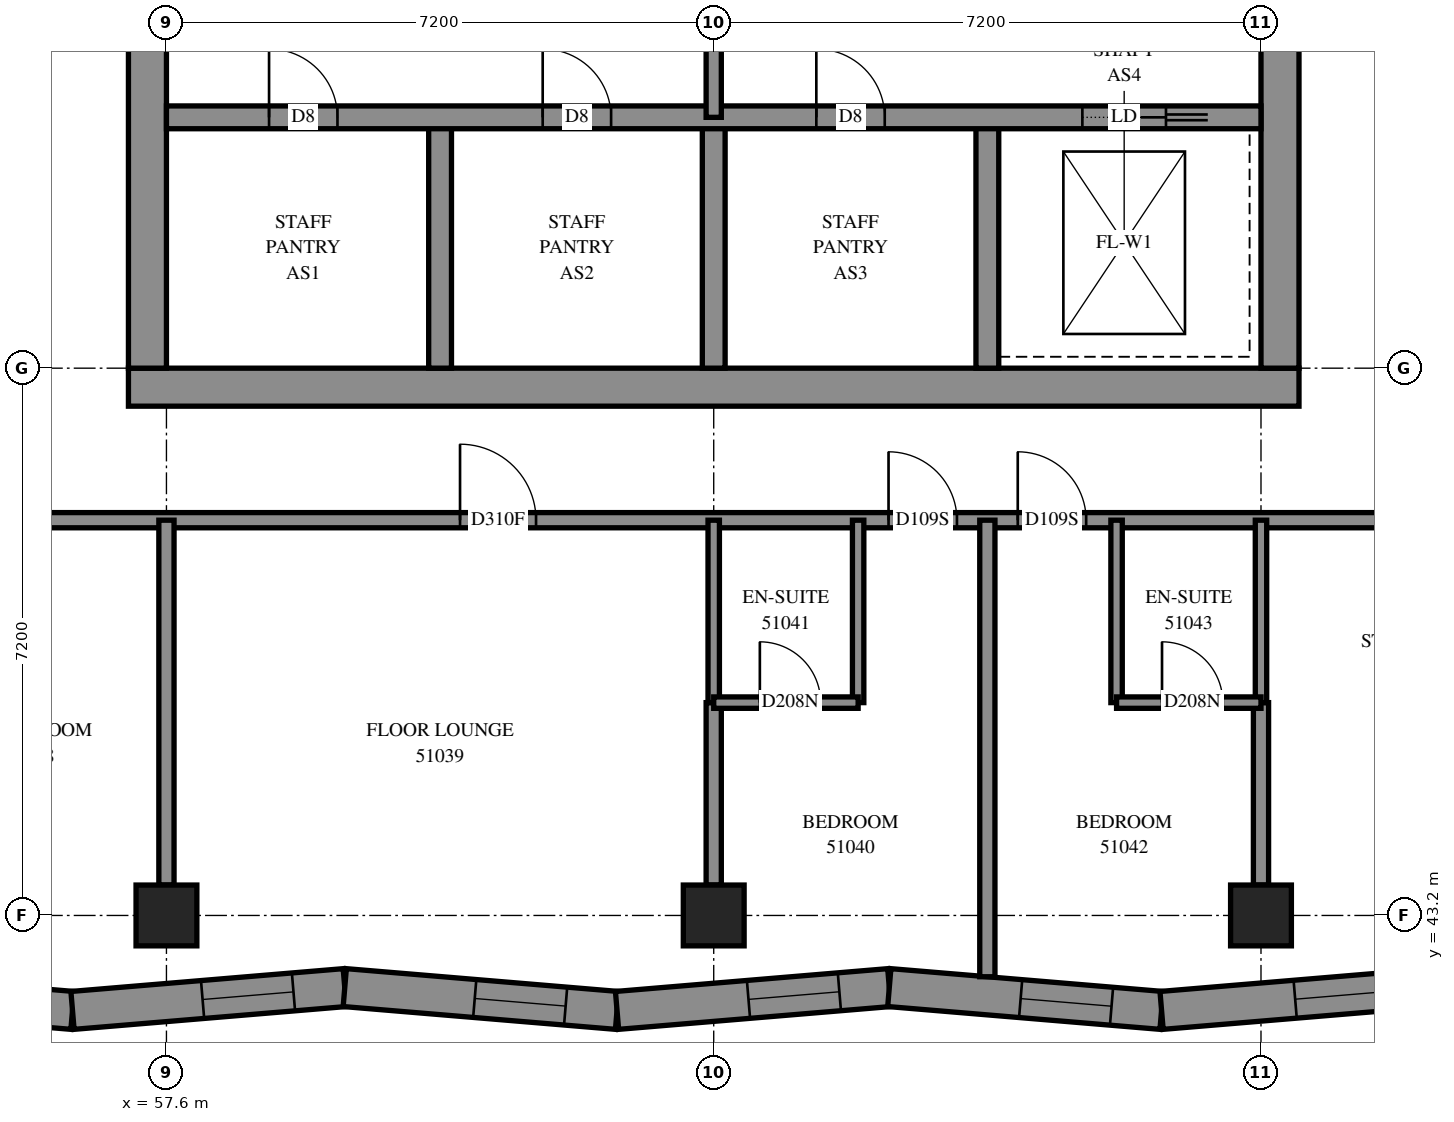
"""IFC4 building model, lengths in metres.
Left out: names, types, materials, properties, quantities, classifications, styles, units other than length and angle.
Written with IfcOpenShell. Run it as: python <this file> out.ifc"""

import sys

from ifc_helpers import new_model, si_unit, direction, frame, frame_2d, origin, origin_2d, place, context, subcontext, project, spatial, polyline, rectangle, outline, extrude, element, fill, save


model = new_model("IFC4")
c1 = context("Model", 3, precision=1e-05, world=origin(), true_north=direction((0.0, 1.0)))
c2 = subcontext(c1, "Body", "Model", "MODEL_VIEW")
j1 = project(units=[si_unit("LENGTHUNIT", "METRE"), si_unit("PLANEANGLEUNIT", "RADIAN")], contexts=[c1])
p1 = place(None, origin())
s1 = spatial("IfcSite", under=j1, at=p1, CompositionType="ELEMENT")
p2 = place(p1, origin())
s2 = spatial("IfcBuilding", under=s1, at=p2, CompositionType="ELEMENT")
p3 = place(p2, frame((0.0, 0.0, 189.6)))
s3 = spatial("IfcBuildingStorey", under=s2, at=p3, CompositionType="ELEMENT", Elevation=189.6)
for number, where, z_axis, x_axis in (
    (1, (57.6, 43.2, 0.0), (0.0, 0.0, 1.0), (1.0, 0.0, 0.0)),
    (2, (64.8, 43.2, 0.0), (0.0, 0.0, 1.0), (1.0, 0.0, 0.0)),
    (3, (72.0, 43.2, 0.0), (0.0, 0.0, 1.0), (1.0, 0.0, 0.0)),
):
    element("IfcColumn", number, at=place(p3, frame(where, z_axis=z_axis, x_axis=x_axis)), inside=s3, PredefinedType="COLUMN", context=c2, shape_type="SweptSolid", body=[
        extrude(rectangle(XDim=0.8, YDim=0.8, at=origin_2d()), origin(), (0.0, 0.0, 1.0), 3.1),
    ])
p4 = place(p3, frame((57.1, 50.15, -0.3), z_axis=(0.0, 0.0, 1.0), x_axis=(1.0, 0.0, 0.0)))
e4 = element("IfcWall", 4, at=p4, inside=s3, PredefinedType="SHEAR", context=c2, shape_type="SweptSolid", body=[
    extrude(rectangle(XDim=15.4, YDim=0.5, at=frame_2d((7.7, 0.0))), origin(), (0.0, 0.0, 1.0), 2.7),
])
p5 = place(p3, frame((57.35, 50.4, -0.3), z_axis=(0.0, 0.0, 1.0), x_axis=(0.0, 1.0, 0.0)))
e5 = element("IfcWall", 5, at=p5, inside=s3, PredefinedType="SHEAR", context=c2, shape_type="SweptSolid", body=[
    extrude(rectangle(XDim=14.4, YDim=0.5, at=frame_2d((7.2, 0.0))), origin(), (0.0, 0.0, 1.0), 2.7),
])
p6 = place(p5, frame((4.55, 0.0, 0.3)))
e6 = element("IfcOpeningElement", 6, at=p6, cuts=e5, PredefinedType="OPENING", context=c2, shape_type="SweptSolid", body=[
    extrude(rectangle(XDim=1.1, YDim=2.1, at=frame_2d((0.55, 1.05))), frame((0.0, 0.26, 0.0), z_axis=(0.0, -1.0, 0.0), x_axis=(1.0, 0.0, 0.0)), (0.0, 0.0, 1.0), 0.52),
])
p7 = place(p5, frame((11.35, 0.0, 0.3)))
e7 = element("IfcOpeningElement", 7, at=p7, cuts=e5, PredefinedType="OPENING", context=c2, shape_type="SweptSolid", body=[
    extrude(rectangle(XDim=1.1, YDim=2.1, at=frame_2d((0.55, 1.05))), frame((0.0, 0.26, 0.0), z_axis=(0.0, -1.0, 0.0), x_axis=(1.0, 0.0, 0.0)), (0.0, 0.0, 1.0), 0.52),
])
p8 = place(p3, frame((72.25, 50.4, -0.3), z_axis=(0.0, 0.0, 1.0), x_axis=(0.0, 1.0, 0.0)))
e8 = element("IfcWall", 8, at=p8, inside=s3, PredefinedType="SHEAR", context=c2, shape_type="SweptSolid", body=[
    extrude(rectangle(XDim=14.4, YDim=0.5, at=frame_2d((7.2, 0.0))), origin(), (0.0, 0.0, 1.0), 2.7),
])
p9 = place(p8, frame((4.55, 0.0, 0.3)))
e9 = element("IfcOpeningElement", 9, at=p9, cuts=e8, PredefinedType="OPENING", context=c2, shape_type="SweptSolid", body=[
    extrude(rectangle(XDim=1.1, YDim=2.1, at=frame_2d((0.55, 1.05))), frame((0.0, 0.26, 0.0), z_axis=(0.0, -1.0, 0.0), x_axis=(1.0, 0.0, 0.0)), (0.0, 0.0, 1.0), 0.52),
])
p10 = place(p8, frame((11.35, 0.0, 0.3)))
e10 = element("IfcOpeningElement", 10, at=p10, cuts=e8, PredefinedType="OPENING", context=c2, shape_type="SweptSolid", body=[
    extrude(rectangle(XDim=1.1, YDim=2.1, at=frame_2d((0.55, 1.05))), frame((0.0, 0.26, 0.0), z_axis=(0.0, -1.0, 0.0), x_axis=(1.0, 0.0, 0.0)), (0.0, 0.0, 1.0), 0.52),
])
for number, where, z_axis, x_axis in (
    (11, (61.2, 50.4, 0.0), (0.0, 0.0, 1.0), (0.0, 1.0, 0.0)),
    (12, (64.8, 50.4, 0.0), (0.0, 0.0, 1.0), (0.0, 1.0, 0.0)),
    (13, (68.4, 50.4, 0.0), (0.0, 0.0, 1.0), (0.0, 1.0, 0.0)),
):
    element("IfcWall", number, at=place(p3, frame(where, z_axis=z_axis, x_axis=x_axis)), inside=s3, PredefinedType="SOLIDWALL", context=c2, shape_type="SweptSolid", body=[
        extrude(rectangle(XDim=3.3, YDim=0.3, at=frame_2d((1.65, 0.0))), origin(), (0.0, 0.0, 1.0), 3.1),
    ])
p11 = place(p3, frame((57.6, 53.7, 0.0), z_axis=(0.0, 0.0, 1.0), x_axis=(1.0, 0.0, 0.0)))
e14 = element("IfcWall", 14, at=p11, inside=s3, PredefinedType="SOLIDWALL", context=c2, shape_type="SweptSolid", body=[
    extrude(rectangle(XDim=14.4, YDim=0.3, at=frame_2d((7.2, 0.0))), origin(), (0.0, 0.0, 1.0), 3.1),
])
p12 = place(p11, frame((1.35, 0.0, 0.0)))
e15 = element("IfcOpeningElement", 15, at=p12, cuts=e14, PredefinedType="OPENING", context=c2, shape_type="SweptSolid", body=[
    extrude(rectangle(XDim=0.9, YDim=2.1, at=frame_2d((0.45, 1.05))), frame((0.0, 0.16, 0.0), z_axis=(0.0, -1.0, 0.0), x_axis=(1.0, 0.0, 0.0)), (0.0, 0.0, 1.0), 0.32),
])
p13 = place(p11, frame((4.95, 0.0, 0.0)))
e16 = element("IfcOpeningElement", 16, at=p13, cuts=e14, PredefinedType="OPENING", context=c2, shape_type="SweptSolid", body=[
    extrude(rectangle(XDim=0.9, YDim=2.1, at=frame_2d((0.45, 1.05))), frame((0.0, 0.16, 0.0), z_axis=(0.0, -1.0, 0.0), x_axis=(1.0, 0.0, 0.0)), (0.0, 0.0, 1.0), 0.32),
])
p14 = place(p11, frame((8.55, 0.0, 0.0)))
e17 = element("IfcOpeningElement", 17, at=p14, cuts=e14, PredefinedType="OPENING", context=c2, shape_type="SweptSolid", body=[
    extrude(rectangle(XDim=0.9, YDim=2.1, at=frame_2d((0.45, 1.05))), frame((0.0, 0.16, 0.0), z_axis=(0.0, -1.0, 0.0), x_axis=(1.0, 0.0, 0.0)), (0.0, 0.0, 1.0), 0.32),
])
p15 = place(p11, frame((12.05, 0.0, 0.0)))
e18 = element("IfcOpeningElement", 18, at=p15, cuts=e14, PredefinedType="OPENING", context=c2, shape_type="SweptSolid", body=[
    extrude(rectangle(XDim=1.1, YDim=2.1, at=frame_2d((0.55, 1.05))), frame((0.0, 0.16, 0.0), z_axis=(0.0, -1.0, 0.0), x_axis=(1.0, 0.0, 0.0)), (0.0, 0.0, 1.0), 0.32),
])
p16 = place(p3, frame((52.761, 42.253, 0.0), z_axis=(0.0, 0.0, 1.0), x_axis=(0.9965117188, -0.0834529466, 0.0)))
e19 = element("IfcWall", 19, at=p16, inside=s3, PredefinedType="SOLIDWALL", context=c2, shape_type="SweptSolid", body=[
    extrude(outline(polyline([(0.042, -0.25), (3.636, -0.25), (3.594, 0.25), (-0.042, 0.25), (0.042, -0.25)])), origin(), (0.0, 0.0, 1.0), 3.1),
])
p17 = place(p16, frame((1.719, 0.0, 0.45)))
e20 = element("IfcOpeningElement", 20, at=p17, cuts=e19, PredefinedType="OPENING", context=c2, shape_type="SweptSolid", body=[
    extrude(rectangle(XDim=1.2, YDim=2.5, at=frame_2d((0.6, 1.25))), frame((0.0, 0.26, 0.0), z_axis=(0.0, -1.0, 0.0), x_axis=(1.0, 0.0, 0.0)), (0.0, 0.0, 1.0), 0.52),
])
p18 = place(p3, frame((56.364, 41.951, 0.0), z_axis=(0.0, 0.0, 1.0), x_axis=(0.9965111369, 0.0834598942, 0.0)))
e21 = element("IfcWall", 21, at=p18, inside=s3, PredefinedType="SOLIDWALL", context=c2, shape_type="SweptSolid", body=[
    extrude(outline(polyline([(-0.021, -0.25), (3.574, -0.25), (3.615, 0.25), (0.021, 0.25), (-0.021, -0.25)])), origin(), (0.0, 0.0, 1.0), 3.1),
])
p19 = place(p18, frame((1.717, 0.0, 0.45)))
e22 = element("IfcOpeningElement", 22, at=p19, cuts=e21, PredefinedType="OPENING", context=c2, shape_type="SweptSolid", body=[
    extrude(rectangle(XDim=1.2, YDim=2.5, at=frame_2d((0.6, 1.25))), frame((0.0, 0.26, 0.0), z_axis=(0.0, -1.0, 0.0), x_axis=(1.0, 0.0, 0.0)), (0.0, 0.0, 1.0), 0.52),
])
p20 = place(p3, frame((59.946, 42.251, 0.0), z_axis=(0.0, 0.0, 1.0), x_axis=(0.9965109432, -0.083462208, 0.0)))
e23 = element("IfcWall", 23, at=p20, inside=s3, PredefinedType="SOLIDWALL", context=c2, shape_type="SweptSolid", body=[
    extrude(outline(polyline([(0.021, -0.25), (3.615, -0.25), (3.574, 0.25), (-0.021, 0.25), (0.021, -0.25)])), origin(), (0.0, 0.0, 1.0), 3.1),
])
p21 = place(p20, frame((1.716, 0.0, 0.45)))
e24 = element("IfcOpeningElement", 24, at=p21, cuts=e23, PredefinedType="OPENING", context=c2, shape_type="SweptSolid", body=[
    extrude(rectangle(XDim=1.2, YDim=2.5, at=frame_2d((0.6, 1.25))), frame((0.0, 0.26, 0.0), z_axis=(0.0, -1.0, 0.0), x_axis=(1.0, 0.0, 0.0)), (0.0, 0.0, 1.0), 0.52),
])
p22 = place(p3, frame((63.528, 41.951, 0.0), z_axis=(0.0, 0.0, 1.0), x_axis=(0.9965111369, 0.0834598942, 0.0)))
e25 = element("IfcWall", 25, at=p22, inside=s3, PredefinedType="SOLIDWALL", context=c2, shape_type="SweptSolid", body=[
    extrude(outline(polyline([(-0.021, -0.25), (3.574, -0.25), (3.615, 0.25), (0.021, 0.25), (-0.021, -0.25)])), origin(), (0.0, 0.0, 1.0), 3.1),
])
p23 = place(p22, frame((1.736, 0.0, 0.45)))
e26 = element("IfcOpeningElement", 26, at=p23, cuts=e25, PredefinedType="OPENING", context=c2, shape_type="SweptSolid", body=[
    extrude(rectangle(XDim=1.2, YDim=2.5, at=frame_2d((0.6, 1.25))), frame((0.0, 0.26, 0.0), z_axis=(0.0, -1.0, 0.0), x_axis=(1.0, 0.0, 0.0)), (0.0, 0.0, 1.0), 0.52),
])
p24 = place(p3, frame((67.11, 42.251, 0.0), z_axis=(0.0, 0.0, 1.0), x_axis=(0.9965111369, -0.0834598942, 0.0)))
e27 = element("IfcWall", 27, at=p24, inside=s3, PredefinedType="SOLIDWALL", context=c2, shape_type="SweptSolid", body=[
    extrude(outline(polyline([(0.021, -0.25), (3.615, -0.25), (3.574, 0.25), (-0.021, 0.25), (0.021, -0.25)])), origin(), (0.0, 0.0, 1.0), 3.1),
])
p25 = place(p24, frame((1.734, 0.0, 0.45)))
e28 = element("IfcOpeningElement", 28, at=p25, cuts=e27, PredefinedType="OPENING", context=c2, shape_type="SweptSolid", body=[
    extrude(rectangle(XDim=1.2, YDim=2.5, at=frame_2d((0.6, 1.25))), frame((0.0, 0.26, 0.0), z_axis=(0.0, -1.0, 0.0), x_axis=(1.0, 0.0, 0.0)), (0.0, 0.0, 1.0), 0.52),
])
p26 = place(p3, frame((70.692, 41.951, 0.0), z_axis=(0.0, 0.0, 1.0), x_axis=(0.9965117188, 0.0834529466, 0.0)))
e29 = element("IfcWall", 29, at=p26, inside=s3, PredefinedType="SOLIDWALL", context=c2, shape_type="SweptSolid", body=[
    extrude(outline(polyline([(-0.021, -0.25), (3.574, -0.25), (3.657, 0.25), (0.021, 0.25), (-0.021, -0.25)])), origin(), (0.0, 0.0, 1.0), 3.1),
])
p27 = place(p26, frame((1.764, 0.0, 0.45)))
e30 = element("IfcOpeningElement", 30, at=p27, cuts=e29, PredefinedType="OPENING", context=c2, shape_type="SweptSolid", body=[
    extrude(rectangle(XDim=1.2, YDim=2.5, at=frame_2d((0.6, 1.25))), frame((0.0, 0.26, 0.0), z_axis=(0.0, -1.0, 0.0), x_axis=(1.0, 0.0, 0.0)), (0.0, 0.0, 1.0), 0.52),
])
p28 = place(p3, frame((64.8, 53.7, 0.0), z_axis=(0.0, 0.0, 1.0), x_axis=(0.0, 1.0, 0.0)))
e31 = element("IfcWall", 31, at=p28, inside=s3, PredefinedType="PARTITIONING", context=c2, shape_type="SweptSolid", body=[
    extrude(rectangle(XDim=3.6, YDim=0.2, at=frame_2d((1.8, 0.0))), origin(), (0.0, 0.0, 1.0), 3.1),
])
p29 = place(p3, frame((55.6, 48.4, 0.0), z_axis=(0.0, 0.0, 1.0), x_axis=(1.0, 0.0, 0.0)))
e32 = element("IfcWall", 32, at=p29, inside=s3, PredefinedType="PARTITIONING", context=c2, shape_type="SweptSolid", body=[
    extrude(rectangle(XDim=18.4, YDim=0.2, at=frame_2d((9.2, 0.0))), origin(), (0.0, 0.0, 1.0), 3.1),
])
p30 = place(p29, frame((5.862, 0.0, 0.0)))
e33 = element("IfcOpeningElement", 33, at=p30, cuts=e32, PredefinedType="OPENING", context=c2, shape_type="SweptSolid", body=[
    extrude(rectangle(XDim=1.0, YDim=2.1, at=frame_2d((0.5, 1.05))), frame((0.0, 0.11, 0.0), z_axis=(0.0, -1.0, 0.0), x_axis=(1.0, 0.0, 0.0)), (0.0, 0.0, 1.0), 0.22),
])
p31 = place(p29, frame((11.5, 0.0, 0.0)))
e34 = element("IfcOpeningElement", 34, at=p31, cuts=e32, PredefinedType="OPENING", context=c2, shape_type="SweptSolid", body=[
    extrude(rectangle(XDim=0.9, YDim=2.1, at=frame_2d((0.45, 1.05))), frame((0.0, 0.11, 0.0), z_axis=(0.0, -1.0, 0.0), x_axis=(1.0, 0.0, 0.0)), (0.0, 0.0, 1.0), 0.22),
])
p32 = place(p29, frame((13.2, 0.0, 0.0)))
e35 = element("IfcOpeningElement", 35, at=p32, cuts=e32, PredefinedType="OPENING", context=c2, shape_type="SweptSolid", body=[
    extrude(rectangle(XDim=0.9, YDim=2.1, at=frame_2d((0.45, 1.05))), frame((0.0, 0.11, 0.0), z_axis=(0.0, -1.0, 0.0), x_axis=(1.0, 0.0, 0.0)), (0.0, 0.0, 1.0), 0.22),
])
p33 = place(p3, frame((68.4, 42.394, 0.0), z_axis=(0.0, 0.0, 1.0), x_axis=(0.0, 1.0, 0.0)))
e36 = element("IfcWall", 36, at=p33, inside=s3, PredefinedType="PARTITIONING", context=c2, shape_type="SweptSolid", body=[
    extrude(rectangle(XDim=6.006, YDim=0.2, at=frame_2d((3.003, 0.0))), origin(), (0.0, 0.0, 1.0), 3.1),
])
p34 = place(p3, frame((57.6, 43.6, 0.0), z_axis=(0.0, 0.0, 1.0), x_axis=(0.0, 1.0, 0.0)))
e37 = element("IfcWall", 37, at=p34, inside=s3, PredefinedType="PARTITIONING", context=c2, shape_type="SweptSolid", body=[
    extrude(rectangle(XDim=4.8, YDim=0.2, at=frame_2d((2.4, 0.0))), origin(), (0.0, 0.0, 1.0), 3.1),
])
p35 = place(p3, frame((64.8, 43.6, 0.0), z_axis=(0.0, 0.0, 1.0), x_axis=(0.0, 1.0, 0.0)))
e38 = element("IfcWall", 38, at=p35, inside=s3, PredefinedType="PARTITIONING", context=c2, shape_type="SweptSolid", body=[
    extrude(rectangle(XDim=2.4, YDim=0.2, at=frame_2d((1.2, 0.0))), origin(), (0.0, 0.0, 1.0), 3.1),
])
for number, where, z_axis, x_axis in (
    (39, (66.7, 46.0, 0.0), (0.0, 0.0, 1.0), (0.0, 1.0, 0.0)),
    (40, (64.8, 46.0, 0.0), (0.0, 0.0, 1.0), (0.0, 1.0, 0.0)),
    (41, (70.1, 46.0, 0.0), (0.0, 0.0, 1.0), (0.0, 1.0, 0.0)),
):
    element("IfcWall", number, at=place(p3, frame(where, z_axis=z_axis, x_axis=x_axis)), inside=s3, PredefinedType="PARTITIONING", context=c2, shape_type="SweptSolid", body=[
        extrude(rectangle(XDim=2.4, YDim=0.15, at=frame_2d((1.2, 0.0))), origin(), (0.0, 0.0, 1.0), 3.1),
    ])
p36 = place(p3, frame((72.0, 43.6, 0.0), z_axis=(0.0, 0.0, 1.0), x_axis=(0.0, 1.0, 0.0)))
e42 = element("IfcWall", 42, at=p36, inside=s3, PredefinedType="PARTITIONING", context=c2, shape_type="SweptSolid", body=[
    extrude(rectangle(XDim=2.4, YDim=0.2, at=frame_2d((1.2, 0.0))), origin(), (0.0, 0.0, 1.0), 3.1),
])
p37 = place(p3, frame((72.0, 46.0, 0.0), z_axis=(0.0, 0.0, 1.0), x_axis=(0.0, 1.0, 0.0)))
e43 = element("IfcWall", 43, at=p37, inside=s3, PredefinedType="PARTITIONING", context=c2, shape_type="SweptSolid", body=[
    extrude(rectangle(XDim=2.4, YDim=0.15, at=frame_2d((1.2, 0.0))), origin(), (0.0, 0.0, 1.0), 3.1),
])
p38 = place(p3, frame((64.8, 46.0, 0.0), z_axis=(0.0, 0.0, 1.0), x_axis=(1.0, 0.0, 0.0)))
e44 = element("IfcWall", 44, at=p38, inside=s3, PredefinedType="PARTITIONING", context=c2, shape_type="SweptSolid", body=[
    extrude(rectangle(XDim=1.9, YDim=0.15, at=frame_2d((0.95, 0.0))), origin(), (0.0, 0.0, 1.0), 3.1),
])
p39 = place(p38, frame((0.607, 0.0, 0.0)))
e45 = element("IfcOpeningElement", 45, at=p39, cuts=e44, PredefinedType="OPENING", context=c2, shape_type="SweptSolid", body=[
    extrude(rectangle(XDim=0.8, YDim=2.1, at=frame_2d((0.4, 1.05))), frame((0.0, 0.085, 0.0), z_axis=(0.0, -1.0, 0.0), x_axis=(1.0, 0.0, 0.0)), (0.0, 0.0, 1.0), 0.17),
])
p40 = place(p3, frame((70.1, 46.0, 0.0), z_axis=(0.0, 0.0, 1.0), x_axis=(1.0, 0.0, 0.0)))
e46 = element("IfcWall", 46, at=p40, inside=s3, PredefinedType="PARTITIONING", context=c2, shape_type="SweptSolid", body=[
    extrude(rectangle(XDim=1.9, YDim=0.15, at=frame_2d((0.95, 0.0))), origin(), (0.0, 0.0, 1.0), 3.1),
])
p41 = place(p40, frame((0.598, 0.0, 0.0)))
e47 = element("IfcOpeningElement", 47, at=p41, cuts=e46, PredefinedType="OPENING", context=c2, shape_type="SweptSolid", body=[
    extrude(rectangle(XDim=0.8, YDim=2.1, at=frame_2d((0.4, 1.05))), frame((0.0, 0.085, 0.0), z_axis=(0.0, -1.0, 0.0), x_axis=(1.0, 0.0, 0.0)), (0.0, 0.0, 1.0), 0.17),
])
p42 = place(p19, origin())
e48 = element("IfcWindow", 48, at=p42, inside=s3, PartitioningType="SINGLE_PANEL", PredefinedType="WINDOW", context=c2, shape_type="SweptSolid", body=[
    extrude(rectangle(XDim=1.2, YDim=2.5, at=frame_2d((0.6, 1.25))), frame((0.0, 0.18, 0.0), z_axis=(0.0, -1.0, 0.0), x_axis=(1.0, 0.0, 0.0)), (0.0, 0.0, 1.0), 0.06),
])
fill(e22, e48)
p43 = place(p21, origin())
e49 = element("IfcWindow", 49, at=p43, inside=s3, PartitioningType="SINGLE_PANEL", PredefinedType="WINDOW", context=c2, shape_type="SweptSolid", body=[
    extrude(rectangle(XDim=1.2, YDim=2.5, at=frame_2d((0.6, 1.25))), frame((0.0, 0.18, 0.0), z_axis=(0.0, -1.0, 0.0), x_axis=(1.0, 0.0, 0.0)), (0.0, 0.0, 1.0), 0.06),
])
fill(e24, e49)
p44 = place(p23, origin())
e50 = element("IfcWindow", 50, at=p44, inside=s3, PartitioningType="SINGLE_PANEL", PredefinedType="WINDOW", context=c2, shape_type="SweptSolid", body=[
    extrude(rectangle(XDim=1.2, YDim=2.5, at=frame_2d((0.6, 1.25))), frame((0.0, 0.18, 0.0), z_axis=(0.0, -1.0, 0.0), x_axis=(1.0, 0.0, 0.0)), (0.0, 0.0, 1.0), 0.06),
])
fill(e26, e50)
p45 = place(p25, origin())
e51 = element("IfcWindow", 51, at=p45, inside=s3, PartitioningType="SINGLE_PANEL", PredefinedType="WINDOW", context=c2, shape_type="SweptSolid", body=[
    extrude(rectangle(XDim=1.2, YDim=2.5, at=frame_2d((0.6, 1.25))), frame((0.0, 0.18, 0.0), z_axis=(0.0, -1.0, 0.0), x_axis=(1.0, 0.0, 0.0)), (0.0, 0.0, 1.0), 0.06),
])
fill(e28, e51)
p46 = place(p27, origin())
e52 = element("IfcWindow", 52, at=p46, inside=s3, PartitioningType="SINGLE_PANEL", PredefinedType="WINDOW", context=c2, shape_type="SweptSolid", body=[
    extrude(rectangle(XDim=1.2, YDim=2.5, at=frame_2d((0.6, 1.25))), frame((0.0, 0.18, 0.0), z_axis=(0.0, -1.0, 0.0), x_axis=(1.0, 0.0, 0.0)), (0.0, 0.0, 1.0), 0.06),
])
fill(e30, e52)
p47 = place(p12, origin())
e53 = element("IfcDoor", 53, at=p47, inside=s3, OperationType="SINGLE_SWING_LEFT", PredefinedType="DOOR", context=c2, shape_type="SweptSolid", body=[
    extrude(rectangle(XDim=0.9, YDim=2.1, at=frame_2d((0.45, 1.05))), frame((0.0, 0.025, 0.0), z_axis=(0.0, -1.0, 0.0), x_axis=(1.0, 0.0, 0.0)), (0.0, 0.0, 1.0), 0.05),
])
fill(e15, e53)
p48 = place(p13, origin())
e54 = element("IfcDoor", 54, at=p48, inside=s3, OperationType="SINGLE_SWING_LEFT", PredefinedType="DOOR", context=c2, shape_type="SweptSolid", body=[
    extrude(rectangle(XDim=0.9, YDim=2.1, at=frame_2d((0.45, 1.05))), frame((0.0, 0.025, 0.0), z_axis=(0.0, -1.0, 0.0), x_axis=(1.0, 0.0, 0.0)), (0.0, 0.0, 1.0), 0.05),
])
fill(e16, e54)
p49 = place(p14, origin())
e55 = element("IfcDoor", 55, at=p49, inside=s3, OperationType="SINGLE_SWING_LEFT", PredefinedType="DOOR", context=c2, shape_type="SweptSolid", body=[
    extrude(rectangle(XDim=0.9, YDim=2.1, at=frame_2d((0.45, 1.05))), frame((0.0, 0.025, 0.0), z_axis=(0.0, -1.0, 0.0), x_axis=(1.0, 0.0, 0.0)), (0.0, 0.0, 1.0), 0.05),
])
fill(e17, e55)
p50 = place(p15, origin())
e56 = element("IfcDoor", 56, at=p50, inside=s3, OperationType="SLIDING_TO_RIGHT", PredefinedType="DOOR", context=c2, shape_type="SweptSolid", body=[
    extrude(rectangle(XDim=1.1, YDim=2.1, at=frame_2d((0.55, 1.05))), frame((0.0, 0.025, 0.0), z_axis=(0.0, -1.0, 0.0), x_axis=(1.0, 0.0, 0.0)), (0.0, 0.0, 1.0), 0.05),
])
fill(e18, e56)
p51 = place(p30, origin())
e57 = element("IfcDoor", 57, at=p51, inside=s3, OperationType="SINGLE_SWING_LEFT", PredefinedType="DOOR", context=c2, shape_type="SweptSolid", body=[
    extrude(rectangle(XDim=1.0, YDim=2.1, at=frame_2d((0.5, 1.05))), frame((0.0, 0.025, 0.0), z_axis=(0.0, -1.0, 0.0), x_axis=(1.0, 0.0, 0.0)), (0.0, 0.0, 1.0), 0.05),
])
fill(e33, e57)
p52 = place(p31, origin())
e58 = element("IfcDoor", 58, at=p52, inside=s3, OperationType="SINGLE_SWING_LEFT", PredefinedType="DOOR", context=c2, shape_type="SweptSolid", body=[
    extrude(rectangle(XDim=0.9, YDim=2.1, at=frame_2d((0.45, 1.05))), frame((0.0, 0.025, 0.0), z_axis=(0.0, -1.0, 0.0), x_axis=(1.0, 0.0, 0.0)), (0.0, 0.0, 1.0), 0.05),
])
fill(e34, e58)
p53 = place(p39, origin())
e59 = element("IfcDoor", 59, at=p53, inside=s3, OperationType="SINGLE_SWING_RIGHT", PredefinedType="DOOR", context=c2, shape_type="SweptSolid", body=[
    extrude(rectangle(XDim=0.8, YDim=2.1, at=frame_2d((0.4, 1.05))), frame((0.0, 0.025, 0.0), z_axis=(0.0, -1.0, 0.0), x_axis=(1.0, 0.0, 0.0)), (0.0, 0.0, 1.0), 0.05),
])
fill(e45, e59)
p54 = place(p32, origin())
e60 = element("IfcDoor", 60, at=p54, inside=s3, OperationType="SINGLE_SWING_RIGHT", PredefinedType="DOOR", context=c2, shape_type="SweptSolid", body=[
    extrude(rectangle(XDim=0.9, YDim=2.1, at=frame_2d((0.45, 1.05))), frame((0.0, 0.025, 0.0), z_axis=(0.0, -1.0, 0.0), x_axis=(1.0, 0.0, 0.0)), (0.0, 0.0, 1.0), 0.05),
])
fill(e35, e60)
p55 = place(p41, origin())
e61 = element("IfcDoor", 61, at=p55, inside=s3, OperationType="SINGLE_SWING_RIGHT", PredefinedType="DOOR", context=c2, shape_type="SweptSolid", body=[
    extrude(rectangle(XDim=0.8, YDim=2.1, at=frame_2d((0.4, 1.05))), frame((0.0, 0.025, 0.0), z_axis=(0.0, -1.0, 0.0), x_axis=(1.0, 0.0, 0.0)), (0.0, 0.0, 1.0), 0.05),
])
fill(e47, e61)
save(model, sys.argv[1])
